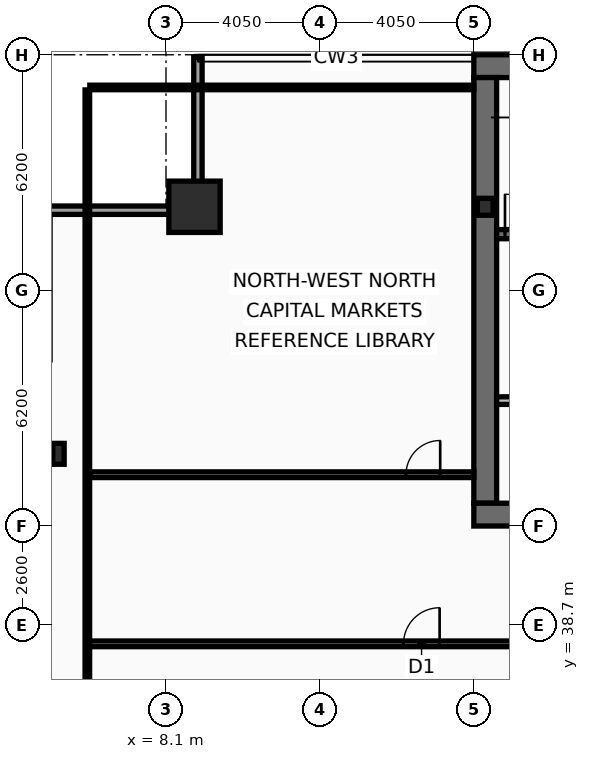
"""IFC4 building model, lengths in metres.
Left out: names, types, materials, properties, quantities, classifications, styles, units other than length and angle.
Written with IfcOpenShell. Run it as: python <this file> out.ifc"""

import sys

from ifc_helpers import new_model, si_unit, direction, frame, frame_2d, origin, origin_2d, place, context, subcontext, project, spatial, rectangle, hollow_rectangle, i_section, extrude, element, fill, save


model = new_model("IFC4")
c1 = context("Model", 3, precision=1e-05, world=origin(), true_north=direction((0.0, 1.0)))
c2 = subcontext(c1, "Body", "Model", "MODEL_VIEW")
j1 = project(units=[si_unit("LENGTHUNIT", "METRE"), si_unit("PLANEANGLEUNIT", "RADIAN")], contexts=[c1])
p1 = place(None, origin())
s1 = spatial("IfcSite", under=j1, at=p1, CompositionType="ELEMENT")
p2 = place(p1, origin())
s2 = spatial("IfcBuilding", under=s1, at=p2, CompositionType="ELEMENT")
p3 = place(p2, frame((0.0, 0.0, 177.0)))
s3 = spatial("IfcBuildingStorey", under=s2, at=p3, CompositionType="ELEMENT", Elevation=177.0)
p4 = place(p3, frame((16.2, 53.4, 0.0), z_axis=(0.0, 0.0, 1.0), x_axis=(1.0, 0.0, 0.0)))
e1 = element("IfcWall", 1, at=p4, inside=s3, PredefinedType="SHEAR", context=c2, shape_type="SweptSolid", body=[
    extrude(rectangle(XDim=40.5, YDim=0.6, at=frame_2d((20.25, 0.0))), origin(), (0.0, 0.0, 1.0), 3.44),
])
p5 = place(p3, frame((16.5, 41.9, 0.0), z_axis=(0.0, 0.0, 1.0), x_axis=(0.0, 1.0, 0.0)))
e2 = element("IfcWall", 2, at=p5, inside=s3, PredefinedType="SHEAR", context=c2, shape_type="SweptSolid", body=[
    extrude(rectangle(XDim=11.2, YDim=0.6, at=frame_2d((5.6, 0.0))), origin(), (0.0, 0.0, 1.0), 3.44),
])
p6 = place(p3, frame((18.65, 41.6, 0.0), z_axis=(0.0, 0.0, 1.0), x_axis=(-1.0, 0.0, 0.0)))
e3 = element("IfcWall", 3, at=p6, inside=s3, PredefinedType="SHEAR", context=c2, shape_type="SweptSolid", body=[
    extrude(rectangle(XDim=2.45, YDim=0.6, at=frame_2d((1.225, 0.0))), origin(), (0.0, 0.0, 1.0), 3.44),
])
p7 = place(p3, frame((16.8, 48.98, 0.0), z_axis=(0.0, 0.0, 1.0), x_axis=(1.0, 0.0, 0.0)))
e4 = element("IfcWall", 4, at=p7, inside=s3, PredefinedType="SHEAR", context=c2, shape_type="SweptSolid", body=[
    extrude(rectangle(XDim=7.42, YDim=0.24, at=frame_2d((3.71, 0.0))), origin(), (0.0, 0.0, 1.0), 3.44),
])
p8 = place(p7, frame((0.22, 0.0, 0.0)))
e5 = element("IfcOpeningElement", 5, at=p8, cuts=e4, PredefinedType="OPENING", context=c2, shape_type="SweptSolid", body=[
    extrude(rectangle(XDim=1.05, YDim=2.15, at=frame_2d((0.525, 1.075))), frame((0.0, 0.13, 0.0), z_axis=(0.0, -1.0, 0.0), x_axis=(1.0, 0.0, 0.0)), (0.0, 0.0, 1.0), 0.26),
])
p9 = place(p3, frame((8.85, 49.7, 0.0), z_axis=(0.0, 0.0, 1.0), x_axis=(1.0, 0.0, 0.0)))
e6 = element("IfcColumn", 6, at=p9, inside=s3, PredefinedType="COLUMN", context=c2, shape_type="SweptSolid", body=[
    extrude(hollow_rectangle(XDim=1.35, YDim=1.35, WallThickness=0.065, at=origin_2d()), origin(), (0.0, 0.0, 1.0), 3.6),
])
p10 = place(p3, frame((5.27, 43.2, 0.0), z_axis=(0.0, 0.0, 1.0), x_axis=(1.0, 0.0, 0.0)))
e7 = element("IfcColumn", 7, at=p10, inside=s3, PredefinedType="COLUMN", context=c2, shape_type="SweptSolid", body=[
    extrude(i_section(OverallWidth=0.3, OverallDepth=0.55, WebThickness=0.015, FlangeThickness=0.029, at=origin_2d()), origin(), (0.0, 0.0, 1.0), 3.6),
])
p11 = place(p3, frame((16.5, 49.7, 0.0), z_axis=(0.0, 0.0, 1.0), x_axis=(1.0, 0.0, 0.0)))
e8 = element("IfcColumn", 8, at=p11, inside=s3, PredefinedType="COLUMN", context=c2, shape_type="SweptSolid", body=[
    extrude(i_section(OverallWidth=0.416, OverallDepth=0.446, WebThickness=0.039, FlangeThickness=0.063, at=origin_2d()), origin(), (0.0, 0.0, 1.0), 3.6),
])
p12 = place(p3, frame((4.83, 49.61, 0.0), z_axis=(0.0, 0.0, 1.0), x_axis=(1.0, 0.0, 0.0)))
e9 = element("IfcWall", 9, at=p12, inside=s3, PredefinedType="SOLIDWALL", context=c2, shape_type="SweptSolid", body=[
    extrude(rectangle(XDim=4.22, YDim=0.22, at=frame_2d((2.11, 0.0))), origin(), (0.0, 0.0, 1.0), 2.83),
])
p13 = place(p3, frame((8.94, 49.72, 0.0), z_axis=(0.0, 0.0, 1.0), x_axis=(0.0, 1.0, 0.0)))
e10 = element("IfcWall", 10, at=p13, inside=s3, PredefinedType="SOLIDWALL", context=c2, shape_type="SweptSolid", body=[
    extrude(rectangle(XDim=3.91, YDim=0.22, at=frame_2d((1.955, 0.0))), origin(), (0.0, 0.0, 1.0), 2.83),
])
p14 = place(p3, frame((16.8, 44.6, 0.0), z_axis=(0.0, 0.0, 1.0), x_axis=(1.0, 0.0, 0.0)))
e11 = element("IfcWall", 11, at=p14, inside=s3, PredefinedType="PARTITIONING", context=c2, shape_type="SweptSolid", body=[
    extrude(rectangle(XDim=4.2, YDim=0.2, at=frame_2d((2.1, 0.0))), origin(), (0.0, 0.0, 1.0), 3.44),
])
p15 = place(p14, frame((1.25, 0.0, 0.0)))
e12 = element("IfcOpeningElement", 12, at=p15, cuts=e11, PredefinedType="OPENING", context=c2, shape_type="SweptSolid", body=[
    extrude(rectangle(XDim=1.05, YDim=2.15, at=frame_2d((0.525, 1.075))), frame((0.0, 0.11, 0.0), z_axis=(0.0, -1.0, 0.0), x_axis=(1.0, 0.0, 0.0)), (0.0, 0.0, 1.0), 0.22),
])
p16 = place(p3, frame((6.03, 38.2, 0.0), z_axis=(0.0, 0.0, 1.0), x_axis=(1.0, 0.0, 0.0)))
e13 = element("IfcWall", 13, at=p16, inside=s3, PredefinedType="PARTITIONING", context=c2, shape_type="SweptSolid", body=[
    extrude(rectangle(XDim=12.52, YDim=0.15, at=frame_2d((6.26, 0.0))), origin(), (0.0, 0.0, 1.0), 2.73),
])
p17 = place(p16, frame((8.32, 0.0, 0.0)))
e14 = element("IfcOpeningElement", 14, at=p17, cuts=e13, PredefinedType="OPENING", context=c2, shape_type="SweptSolid", body=[
    extrude(rectangle(XDim=0.95, YDim=2.05, at=frame_2d((0.475, 1.025))), frame((0.0, 0.085, 0.0), z_axis=(0.0, -1.0, 0.0), x_axis=(1.0, 0.0, 0.0)), (0.0, 0.0, 1.0), 0.17),
])
p18 = place(p3, frame((6.095, 42.65, 0.0), z_axis=(0.0, 0.0, 1.0), x_axis=(1.0, 0.0, 0.0)))
e15 = element("IfcWall", 15, at=p18, inside=s3, PredefinedType="PARTITIONING", context=c2, shape_type="SweptSolid", body=[
    extrude(rectangle(XDim=10.105, YDim=0.15, at=frame_2d((5.052, 0.0))), origin(), (0.0, 0.0, 1.0), 2.73),
])
p19 = place(p18, frame((8.32, 0.0, 0.0)))
e16 = element("IfcOpeningElement", 16, at=p19, cuts=e15, PredefinedType="OPENING", context=c2, shape_type="SweptSolid", body=[
    extrude(rectangle(XDim=0.9, YDim=2.05, at=frame_2d((0.45, 1.025))), frame((0.0, 0.085, 0.0), z_axis=(0.0, -1.0, 0.0), x_axis=(1.0, 0.0, 0.0)), (0.0, 0.0, 1.0), 0.17),
])
p20 = place(p3, frame((6.03, 10.665, 0.0), z_axis=(0.0, 0.0, 1.0), x_axis=(0.0, 1.0, 0.0)))
e17 = element("IfcWall", 17, at=p20, inside=s3, PredefinedType="PARTITIONING", context=c2, shape_type="SweptSolid", body=[
    extrude(rectangle(XDim=42.11, YDim=0.12, at=frame_2d((21.055, 0.0))), origin(), (0.0, 0.0, 1.0), 2.73),
])
p21 = place(p3, frame((6.095, 52.84, 0.0), z_axis=(0.0, 0.0, 1.0), x_axis=(1.0, 0.0, 0.0)))
e18 = element("IfcWall", 18, at=p21, inside=s3, PredefinedType="PARTITIONING", context=c2, shape_type="SweptSolid", body=[
    extrude(rectangle(XDim=10.105, YDim=0.12, at=frame_2d((5.052, 0.0))), origin(), (0.0, 0.0, 1.0), 3.44),
])
p22 = place(p8, origin())
e19 = element("IfcDoor", 19, at=p22, inside=s3, OperationType="SINGLE_SWING_LEFT", PredefinedType="DOOR", context=c2, shape_type="SweptSolid", body=[
    extrude(rectangle(XDim=1.05, YDim=2.15, at=frame_2d((0.525, 1.075))), frame((0.0, 0.025, 0.0), z_axis=(0.0, -1.0, 0.0), x_axis=(1.0, 0.0, 0.0)), (0.0, 0.0, 1.0), 0.05),
])
fill(e5, e19)
p23 = place(p17, origin())
e20 = element("IfcDoor", 20, at=p23, inside=s3, OperationType="SINGLE_SWING_RIGHT", PredefinedType="DOOR", context=c2, shape_type="SweptSolid", body=[
    extrude(rectangle(XDim=0.95, YDim=2.05, at=frame_2d((0.475, 1.025))), frame((0.0, 0.025, 0.0), z_axis=(0.0, -1.0, 0.0), x_axis=(1.0, 0.0, 0.0)), (0.0, 0.0, 1.0), 0.05),
])
fill(e14, e20)
p24 = place(p19, origin())
e21 = element("IfcDoor", 21, at=p24, inside=s3, OperationType="SINGLE_SWING_RIGHT", PredefinedType="DOOR", context=c2, shape_type="SweptSolid", body=[
    extrude(rectangle(XDim=0.9, YDim=2.05, at=frame_2d((0.45, 1.025))), frame((0.0, 0.025, 0.0), z_axis=(0.0, -1.0, 0.0), x_axis=(1.0, 0.0, 0.0)), (0.0, 0.0, 1.0), 0.05),
])
fill(e16, e21)
save(model, sys.argv[1])
